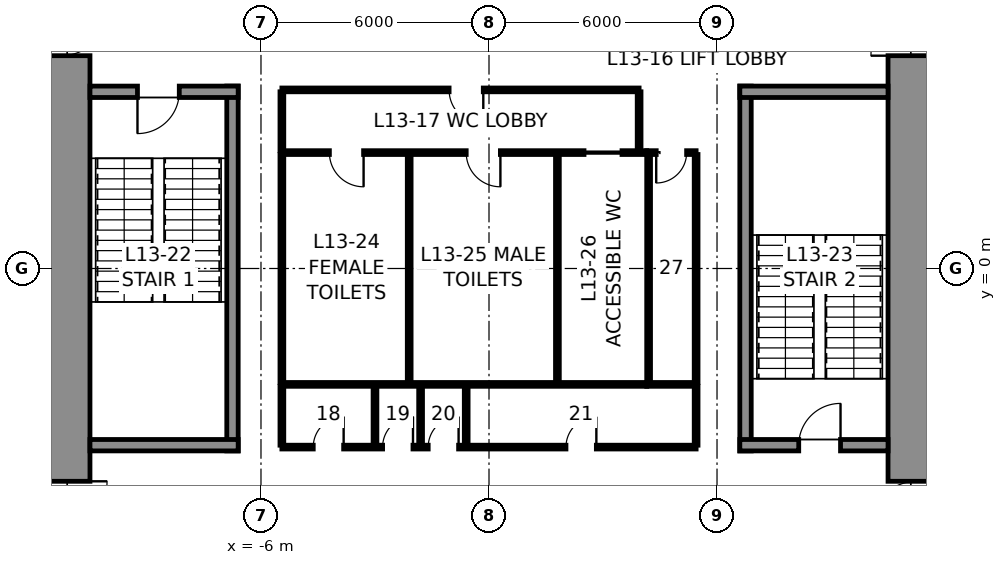
"""IFC4 building model, lengths in metres.
Left out: names, types, materials, properties, quantities, classifications, styles, units other than length and angle.
Written with IfcOpenShell. Run it as: python <this file> out.ifc"""

import sys

from ifc_helpers import new_model, si_unit, direction, frame, frame_2d, origin, place, context, subcontext, project, spatial, rectangle, extrude, element, fill, save


model = new_model("IFC4")
c1 = context("Model", 3, precision=1e-05, world=origin(), true_north=direction((0.0, 1.0)))
c2 = subcontext(c1, "Body", "Model", "MODEL_VIEW")
j1 = project(units=[si_unit("LENGTHUNIT", "METRE"), si_unit("PLANEANGLEUNIT", "RADIAN")], contexts=[c1])
p1 = place(None, origin())
s1 = spatial("IfcSite", under=j1, at=p1, CompositionType="ELEMENT")
p2 = place(p1, origin())
s2 = spatial("IfcBuilding", under=s1, at=p2, CompositionType="ELEMENT")
p3 = place(p2, frame((0.0, 0.0, 70.5)))
s3 = spatial("IfcBuildingStorey", under=s2, at=p3, CompositionType="ELEMENT", Elevation=70.5)
p4 = place(p3, frame((11.25, 10.5, 0.0), z_axis=(0.0, 0.0, 1.0), x_axis=(0.0, -1.0, 0.0)))
e1 = element("IfcWall", 1, at=p4, inside=s3, PredefinedType="SHEAR", context=c2, shape_type="SweptSolid", body=[
    extrude(rectangle(XDim=21.0, YDim=1.5, at=frame_2d((10.5, 0.0))), origin(), (0.0, 0.0, 1.0), 5.5),
])
p5 = place(p4, frame((3.7, 0.0, 0.0)))
e2 = element("IfcOpeningElement", 2, at=p5, cuts=e1, PredefinedType="OPENING", context=c2, shape_type="SweptSolid", body=[
    extrude(rectangle(XDim=1.2, YDim=2.3, at=frame_2d((0.6, 1.15))), frame((0.0, 0.76, 0.0), z_axis=(0.0, -1.0, 0.0), x_axis=(1.0, 0.0, 0.0)), (0.0, 0.0, 1.0), 1.52),
])
p6 = place(p4, frame((16.1, 0.0, 0.0)))
e3 = element("IfcOpeningElement", 3, at=p6, cuts=e1, PredefinedType="OPENING", context=c2, shape_type="SweptSolid", body=[
    extrude(rectangle(XDim=1.2, YDim=2.3, at=frame_2d((0.6, 1.15))), frame((0.0, 0.76, 0.0), z_axis=(0.0, -1.0, 0.0), x_axis=(1.0, 0.0, 0.0)), (0.0, 0.0, 1.0), 1.52),
])
p7 = place(p3, frame((-11.25, -10.5, 0.0), z_axis=(0.0, 0.0, 1.0), x_axis=(0.0, 1.0, 0.0)))
e4 = element("IfcWall", 4, at=p7, inside=s3, PredefinedType="SHEAR", context=c2, shape_type="SweptSolid", body=[
    extrude(rectangle(XDim=21.0, YDim=1.5, at=frame_2d((10.5, 0.0))), origin(), (0.0, 0.0, 1.0), 5.5),
])
p8 = place(p7, frame((16.1, 0.0, 0.0)))
e5 = element("IfcOpeningElement", 5, at=p8, cuts=e4, PredefinedType="OPENING", context=c2, shape_type="SweptSolid", body=[
    extrude(rectangle(XDim=1.2, YDim=2.3, at=frame_2d((0.6, 1.15))), frame((0.0, 0.76, 0.0), z_axis=(0.0, -1.0, 0.0), x_axis=(1.0, 0.0, 0.0)), (0.0, 0.0, 1.0), 1.52),
])
p9 = place(p7, frame((3.7, 0.0, 0.0)))
e6 = element("IfcOpeningElement", 6, at=p9, cuts=e4, PredefinedType="OPENING", context=c2, shape_type="SweptSolid", body=[
    extrude(rectangle(XDim=1.2, YDim=2.3, at=frame_2d((0.6, 1.15))), frame((0.0, 0.76, 0.0), z_axis=(0.0, -1.0, 0.0), x_axis=(1.0, 0.0, 0.0)), (0.0, 0.0, 1.0), 1.52),
])
p10 = place(p3, frame((-6.75, -4.8, 0.0), z_axis=(0.0, 0.0, 1.0), x_axis=(0.0, 1.0, 0.0)))
e7 = element("IfcWall", 7, at=p10, inside=s3, PredefinedType="SOLIDWALL", context=c2, shape_type="SweptSolid", body=[
    extrude(rectangle(XDim=9.6, YDim=0.3, at=frame_2d((4.8, 0.0))), origin(), (0.0, 0.0, 1.0), 5.25),
])
p11 = place(p3, frame((-10.5, 4.65, 0.0), z_axis=(0.0, 0.0, 1.0), x_axis=(1.0, 0.0, 0.0)))
e8 = element("IfcWall", 8, at=p11, inside=s3, PredefinedType="SOLIDWALL", context=c2, shape_type="SweptSolid", body=[
    extrude(rectangle(XDim=3.9, YDim=0.3, at=frame_2d((1.95, 0.0))), origin(), (0.0, 0.0, 1.0), 5.25),
])
p12 = place(p11, frame((1.25, 0.0, 0.0)))
e9 = element("IfcOpeningElement", 9, at=p12, cuts=e8, PredefinedType="OPENING", context=c2, shape_type="SweptSolid", body=[
    extrude(rectangle(XDim=1.1, YDim=2.3, at=frame_2d((0.55, 1.15))), frame((0.0, 0.16, 0.0), z_axis=(0.0, -1.0, 0.0), x_axis=(1.0, 0.0, 0.0)), (0.0, 0.0, 1.0), 0.32),
])
p13 = place(p3, frame((-6.6, -4.65, 0.0), z_axis=(0.0, 0.0, 1.0), x_axis=(-1.0, 0.0, 0.0)))
e10 = element("IfcWall", 10, at=p13, inside=s3, PredefinedType="SOLIDWALL", context=c2, shape_type="SweptSolid", body=[
    extrude(rectangle(XDim=3.9, YDim=0.3, at=frame_2d((1.95, 0.0))), origin(), (0.0, 0.0, 1.0), 5.25),
])
p14 = place(p3, frame((6.75, -4.8, 0.0), z_axis=(0.0, 0.0, 1.0), x_axis=(0.0, 1.0, 0.0)))
e11 = element("IfcWall", 11, at=p14, inside=s3, PredefinedType="SOLIDWALL", context=c2, shape_type="SweptSolid", body=[
    extrude(rectangle(XDim=9.6, YDim=0.3, at=frame_2d((4.8, 0.0))), origin(), (0.0, 0.0, 1.0), 5.25),
])
p15 = place(p3, frame((6.6, 4.65, 0.0), z_axis=(0.0, 0.0, 1.0), x_axis=(1.0, 0.0, 0.0)))
e12 = element("IfcWall", 12, at=p15, inside=s3, PredefinedType="SOLIDWALL", context=c2, shape_type="SweptSolid", body=[
    extrude(rectangle(XDim=3.9, YDim=0.3, at=frame_2d((1.95, 0.0))), origin(), (0.0, 0.0, 1.0), 5.25),
])
p16 = place(p3, frame((10.5, -4.65, 0.0), z_axis=(0.0, 0.0, 1.0), x_axis=(-1.0, 0.0, 0.0)))
e13 = element("IfcWall", 13, at=p16, inside=s3, PredefinedType="SOLIDWALL", context=c2, shape_type="SweptSolid", body=[
    extrude(rectangle(XDim=3.9, YDim=0.3, at=frame_2d((1.95, 0.0))), origin(), (0.0, 0.0, 1.0), 5.25),
])
p17 = place(p16, frame((1.25, 0.0, 0.0)))
e14 = element("IfcOpeningElement", 14, at=p17, cuts=e13, PredefinedType="OPENING", context=c2, shape_type="SweptSolid", body=[
    extrude(rectangle(XDim=1.1, YDim=2.3, at=frame_2d((0.55, 1.15))), frame((0.0, 0.16, 0.0), z_axis=(0.0, -1.0, 0.0), x_axis=(1.0, 0.0, 0.0)), (0.0, 0.0, 1.0), 0.32),
])
p18 = place(p3, frame((-5.45, 3.05, 0.0), z_axis=(0.0, 0.0, 1.0), x_axis=(1.0, 0.0, 0.0)))
e15 = element("IfcWall", 15, at=p18, inside=s3, PredefinedType="PARTITIONING", context=c2, shape_type="SweptSolid", body=[
    extrude(rectangle(XDim=9.6, YDim=0.1, at=frame_2d((4.8, 0.0))), origin(), (0.0, 0.0, 1.0), 5.25),
])
p19 = place(p18, frame((1.25, 0.0, 0.0)))
e16 = element("IfcOpeningElement", 16, at=p19, cuts=e15, PredefinedType="OPENING", context=c2, shape_type="SweptSolid", body=[
    extrude(rectangle(XDim=0.9, YDim=2.3, at=frame_2d((0.45, 1.15))), frame((0.0, 0.06, 0.0), z_axis=(0.0, -1.0, 0.0), x_axis=(1.0, 0.0, 0.0)), (0.0, 0.0, 1.0), 0.12),
])
p20 = place(p18, frame((4.85, 0.0, 0.0)))
e17 = element("IfcOpeningElement", 17, at=p20, cuts=e15, PredefinedType="OPENING", context=c2, shape_type="SweptSolid", body=[
    extrude(rectangle(XDim=0.9, YDim=2.3, at=frame_2d((0.45, 1.15))), frame((0.0, 0.06, 0.0), z_axis=(0.0, -1.0, 0.0), x_axis=(1.0, 0.0, 0.0)), (0.0, 0.0, 1.0), 0.12),
])
p21 = place(p18, frame((7.95, 0.0, 0.0)))
e18 = element("IfcOpeningElement", 18, at=p21, cuts=e15, PredefinedType="OPENING", context=c2, shape_type="SweptSolid", body=[
    extrude(rectangle(XDim=1.0, YDim=2.3, at=frame_2d((0.5, 1.15))), frame((0.0, 0.06, 0.0), z_axis=(0.0, -1.0, 0.0), x_axis=(1.0, 0.0, 0.0)), (0.0, 0.0, 1.0), 0.12),
])
p22 = place(p3, frame((4.15, 3.05, 0.0), z_axis=(0.0, 0.0, 1.0), x_axis=(1.0, 0.0, 0.0)))
e19 = element("IfcWall", 19, at=p22, inside=s3, PredefinedType="PARTITIONING", context=c2, shape_type="SweptSolid", body=[
    extrude(rectangle(XDim=1.3, YDim=0.1, at=frame_2d((0.65, 0.0))), origin(), (0.0, 0.0, 1.0), 5.25),
])
p23 = place(p22, frame((0.25, 0.0, 0.0)))
e20 = element("IfcOpeningElement", 20, at=p23, cuts=e19, PredefinedType="OPENING", context=c2, shape_type="SweptSolid", body=[
    extrude(rectangle(XDim=0.8, YDim=2.3, at=frame_2d((0.4, 1.15))), frame((0.0, 0.06, 0.0), z_axis=(0.0, -1.0, 0.0), x_axis=(1.0, 0.0, 0.0)), (0.0, 0.0, 1.0), 0.12),
])
p24 = place(p3, frame((4.15, -3.05, 0.0), z_axis=(0.0, 0.0, 1.0), x_axis=(-1.0, 0.0, 0.0)))
e21 = element("IfcWall", 21, at=p24, inside=s3, PredefinedType="PARTITIONING", context=c2, shape_type="SweptSolid", body=[
    extrude(rectangle(XDim=9.6, YDim=0.1, at=frame_2d((4.8, 0.0))), origin(), (0.0, 0.0, 1.0), 5.25),
])
p25 = place(p3, frame((5.45, -3.05, 0.0), z_axis=(0.0, 0.0, 1.0), x_axis=(-1.0, 0.0, 0.0)))
e22 = element("IfcWall", 22, at=p25, inside=s3, PredefinedType="PARTITIONING", context=c2, shape_type="SweptSolid", body=[
    extrude(rectangle(XDim=1.3, YDim=0.1, at=frame_2d((0.65, 0.0))), origin(), (0.0, 0.0, 1.0), 5.25),
])
for number, where, z_axis, x_axis in (
    (23, (5.45, 3.0, 0.0), (0.0, 0.0, 1.0), (0.0, -1.0, 0.0)),
    (24, (-5.45, -3.0, 0.0), (0.0, 0.0, 1.0), (0.0, 1.0, 0.0)),
    (25, (-2.1, -3.0, 0.0), (0.0, 0.0, 1.0), (0.0, 1.0, 0.0)),
    (26, (1.8, -3.0, 0.0), (0.0, 0.0, 1.0), (0.0, 1.0, 0.0)),
    (27, (4.2, -3.0, 0.0), (0.0, 0.0, 1.0), (0.0, 1.0, 0.0)),
):
    element("IfcWall", number, at=place(p3, frame(where, z_axis=z_axis, x_axis=x_axis)), inside=s3, PredefinedType="PARTITIONING", context=c2, shape_type="SweptSolid", body=[
        extrude(rectangle(XDim=6.0, YDim=0.1, at=frame_2d((3.0, 0.0))), origin(), (0.0, 0.0, 1.0), 5.25),
    ])
p26 = place(p3, frame((-5.45, 4.7, 0.0), z_axis=(0.0, 0.0, 1.0), x_axis=(1.0, 0.0, 0.0)))
e28 = element("IfcWall", 28, at=p26, inside=s3, PredefinedType="PARTITIONING", context=c2, shape_type="SweptSolid", body=[
    extrude(rectangle(XDim=9.4, YDim=0.1, at=frame_2d((4.7, 0.0))), origin(), (0.0, 0.0, 1.0), 5.25),
])
p27 = place(p26, frame((4.4, 0.0, 0.0)))
e29 = element("IfcOpeningElement", 29, at=p27, cuts=e28, PredefinedType="OPENING", context=c2, shape_type="SweptSolid", body=[
    extrude(rectangle(XDim=0.9, YDim=2.3, at=frame_2d((0.45, 1.15))), frame((0.0, 0.06, 0.0), z_axis=(0.0, -1.0, 0.0), x_axis=(1.0, 0.0, 0.0)), (0.0, 0.0, 1.0), 0.12),
])
for number, where, z_axis, x_axis in (
    (30, (-5.45, 3.1, 0.0), (0.0, 0.0, 1.0), (0.0, 1.0, 0.0)),
    (31, (3.95, 3.1, 0.0), (0.0, 0.0, 1.0), (0.0, 1.0, 0.0)),
):
    element("IfcWall", number, at=place(p3, frame(where, z_axis=z_axis, x_axis=x_axis)), inside=s3, PredefinedType="PARTITIONING", context=c2, shape_type="SweptSolid", body=[
        extrude(rectangle(XDim=1.55, YDim=0.1, at=frame_2d((0.775, 0.0))), origin(), (0.0, 0.0, 1.0), 5.25),
    ])
p28 = place(p3, frame((5.45, -4.7, 0.0), z_axis=(0.0, 0.0, 1.0), x_axis=(-1.0, 0.0, 0.0)))
e32 = element("IfcWall", 32, at=p28, inside=s3, PredefinedType="PARTITIONING", context=c2, shape_type="SweptSolid", body=[
    extrude(rectangle(XDim=10.9, YDim=0.1, at=frame_2d((5.45, 0.0))), origin(), (0.0, 0.0, 1.0), 5.25),
])
p29 = place(p28, frame((9.275, 0.0, 0.0)))
e33 = element("IfcOpeningElement", 33, at=p29, cuts=e32, PredefinedType="OPENING", context=c2, shape_type="SweptSolid", body=[
    extrude(rectangle(XDim=0.8, YDim=2.3, at=frame_2d((0.4, 1.15))), frame((0.0, 0.06, 0.0), z_axis=(0.0, -1.0, 0.0), x_axis=(1.0, 0.0, 0.0)), (0.0, 0.0, 1.0), 0.12),
])
p30 = place(p28, frame((7.45, 0.0, 0.0)))
e34 = element("IfcOpeningElement", 34, at=p30, cuts=e32, PredefinedType="OPENING", context=c2, shape_type="SweptSolid", body=[
    extrude(rectangle(XDim=0.8, YDim=2.3, at=frame_2d((0.4, 1.15))), frame((0.0, 0.06, 0.0), z_axis=(0.0, -1.0, 0.0), x_axis=(1.0, 0.0, 0.0)), (0.0, 0.0, 1.0), 0.12),
])
p31 = place(p28, frame((6.25, 0.0, 0.0)))
e35 = element("IfcOpeningElement", 35, at=p31, cuts=e32, PredefinedType="OPENING", context=c2, shape_type="SweptSolid", body=[
    extrude(rectangle(XDim=0.8, YDim=2.3, at=frame_2d((0.4, 1.15))), frame((0.0, 0.06, 0.0), z_axis=(0.0, -1.0, 0.0), x_axis=(1.0, 0.0, 0.0)), (0.0, 0.0, 1.0), 0.12),
])
p32 = place(p28, frame((2.625, 0.0, 0.0)))
e36 = element("IfcOpeningElement", 36, at=p32, cuts=e32, PredefinedType="OPENING", context=c2, shape_type="SweptSolid", body=[
    extrude(rectangle(XDim=0.8, YDim=2.3, at=frame_2d((0.4, 1.15))), frame((0.0, 0.06, 0.0), z_axis=(0.0, -1.0, 0.0), x_axis=(1.0, 0.0, 0.0)), (0.0, 0.0, 1.0), 0.12),
])
for number, where, z_axis, x_axis in (
    (37, (-5.45, -3.1, 0.0), (0.0, 0.0, 1.0), (0.0, -1.0, 0.0)),
    (38, (5.45, -3.1, 0.0), (0.0, 0.0, 1.0), (0.0, -1.0, 0.0)),
    (39, (-3.0, -3.1, 0.0), (0.0, 0.0, 1.0), (0.0, -1.0, 0.0)),
    (40, (-1.8, -3.1, 0.0), (0.0, 0.0, 1.0), (0.0, -1.0, 0.0)),
    (41, (-0.6, -3.1, 0.0), (0.0, 0.0, 1.0), (0.0, -1.0, 0.0)),
):
    element("IfcWall", number, at=place(p3, frame(where, z_axis=z_axis, x_axis=x_axis)), inside=s3, PredefinedType="PARTITIONING", context=c2, shape_type="SweptSolid", body=[
        extrude(rectangle(XDim=1.55, YDim=0.1, at=frame_2d((0.775, 0.0))), origin(), (0.0, 0.0, 1.0), 5.25),
    ])
p33 = place(p12, frame((1.1, 0.0, 0.0), z_axis=(0.0, 0.0, 1.0), x_axis=(-1.0, 0.0, 0.0)))
e42 = element("IfcDoor", 42, at=p33, inside=s3, OperationType="SINGLE_SWING_RIGHT", PredefinedType="DOOR", context=c2, shape_type="SweptSolid", body=[
    extrude(rectangle(XDim=1.1, YDim=2.3, at=frame_2d((0.55, 1.15))), frame((0.0, 0.025, 0.0), z_axis=(0.0, -1.0, 0.0), x_axis=(1.0, 0.0, 0.0)), (0.0, 0.0, 1.0), 0.05),
])
fill(e9, e42)
p34 = place(p17, frame((1.1, 0.0, 0.0), z_axis=(0.0, 0.0, 1.0), x_axis=(-1.0, 0.0, 0.0)))
e43 = element("IfcDoor", 43, at=p34, inside=s3, OperationType="SINGLE_SWING_RIGHT", PredefinedType="DOOR", context=c2, shape_type="SweptSolid", body=[
    extrude(rectangle(XDim=1.1, YDim=2.3, at=frame_2d((0.55, 1.15))), frame((0.0, 0.025, 0.0), z_axis=(0.0, -1.0, 0.0), x_axis=(1.0, 0.0, 0.0)), (0.0, 0.0, 1.0), 0.05),
])
fill(e14, e43)
p35 = place(p19, frame((0.9, 0.0, 0.0), z_axis=(0.0, 0.0, 1.0), x_axis=(-1.0, 0.0, 0.0)))
e44 = element("IfcDoor", 44, at=p35, inside=s3, OperationType="SINGLE_SWING_LEFT", PredefinedType="DOOR", context=c2, shape_type="SweptSolid", body=[
    extrude(rectangle(XDim=0.9, YDim=2.3, at=frame_2d((0.45, 1.15))), frame((0.0, 0.025, 0.0), z_axis=(0.0, -1.0, 0.0), x_axis=(1.0, 0.0, 0.0)), (0.0, 0.0, 1.0), 0.05),
])
fill(e16, e44)
p36 = place(p20, frame((0.9, 0.0, 0.0), z_axis=(0.0, 0.0, 1.0), x_axis=(-1.0, 0.0, 0.0)))
e45 = element("IfcDoor", 45, at=p36, inside=s3, OperationType="SINGLE_SWING_LEFT", PredefinedType="DOOR", context=c2, shape_type="SweptSolid", body=[
    extrude(rectangle(XDim=0.9, YDim=2.3, at=frame_2d((0.45, 1.15))), frame((0.0, 0.025, 0.0), z_axis=(0.0, -1.0, 0.0), x_axis=(1.0, 0.0, 0.0)), (0.0, 0.0, 1.0), 0.05),
])
fill(e17, e45)
p37 = place(p21, frame((1.0, 0.0, 0.0), z_axis=(0.0, 0.0, 1.0), x_axis=(-1.0, 0.0, 0.0)))
e46 = element("IfcDoor", 46, at=p37, inside=s3, OperationType="SLIDING_TO_LEFT", PredefinedType="DOOR", context=c2, shape_type="SweptSolid", body=[
    extrude(rectangle(XDim=1.0, YDim=2.3, at=frame_2d((0.5, 1.15))), frame((0.0, 0.025, 0.0), z_axis=(0.0, -1.0, 0.0), x_axis=(1.0, 0.0, 0.0)), (0.0, 0.0, 1.0), 0.05),
])
fill(e18, e46)
p38 = place(p23, frame((0.8, 0.0, 0.0), z_axis=(0.0, 0.0, 1.0), x_axis=(-1.0, 0.0, 0.0)))
e47 = element("IfcDoor", 47, at=p38, inside=s3, OperationType="SINGLE_SWING_RIGHT", PredefinedType="DOOR", context=c2, shape_type="SweptSolid", body=[
    extrude(rectangle(XDim=0.8, YDim=2.3, at=frame_2d((0.4, 1.15))), frame((0.0, 0.025, 0.0), z_axis=(0.0, -1.0, 0.0), x_axis=(1.0, 0.0, 0.0)), (0.0, 0.0, 1.0), 0.05),
])
fill(e20, e47)
p39 = place(p27, frame((0.9, 0.0, 0.0), z_axis=(0.0, 0.0, 1.0), x_axis=(-1.0, 0.0, 0.0)))
e48 = element("IfcDoor", 48, at=p39, inside=s3, OperationType="SINGLE_SWING_LEFT", PredefinedType="DOOR", context=c2, shape_type="SweptSolid", body=[
    extrude(rectangle(XDim=0.9, YDim=2.3, at=frame_2d((0.45, 1.15))), frame((0.0, 0.025, 0.0), z_axis=(0.0, -1.0, 0.0), x_axis=(1.0, 0.0, 0.0)), (0.0, 0.0, 1.0), 0.05),
])
fill(e29, e48)
p40 = place(p29, frame((0.8, 0.0, 0.0), z_axis=(0.0, 0.0, 1.0), x_axis=(-1.0, 0.0, 0.0)))
e49 = element("IfcDoor", 49, at=p40, inside=s3, OperationType="SINGLE_SWING_RIGHT", PredefinedType="DOOR", context=c2, shape_type="SweptSolid", body=[
    extrude(rectangle(XDim=0.8, YDim=2.3, at=frame_2d((0.4, 1.15))), frame((0.0, 0.025, 0.0), z_axis=(0.0, -1.0, 0.0), x_axis=(1.0, 0.0, 0.0)), (0.0, 0.0, 1.0), 0.05),
])
fill(e33, e49)
p41 = place(p30, frame((0.8, 0.0, 0.0), z_axis=(0.0, 0.0, 1.0), x_axis=(-1.0, 0.0, 0.0)))
e50 = element("IfcDoor", 50, at=p41, inside=s3, OperationType="SINGLE_SWING_RIGHT", PredefinedType="DOOR", context=c2, shape_type="SweptSolid", body=[
    extrude(rectangle(XDim=0.8, YDim=2.3, at=frame_2d((0.4, 1.15))), frame((0.0, 0.025, 0.0), z_axis=(0.0, -1.0, 0.0), x_axis=(1.0, 0.0, 0.0)), (0.0, 0.0, 1.0), 0.05),
])
fill(e34, e50)
p42 = place(p31, frame((0.8, 0.0, 0.0), z_axis=(0.0, 0.0, 1.0), x_axis=(-1.0, 0.0, 0.0)))
e51 = element("IfcDoor", 51, at=p42, inside=s3, OperationType="SINGLE_SWING_RIGHT", PredefinedType="DOOR", context=c2, shape_type="SweptSolid", body=[
    extrude(rectangle(XDim=0.8, YDim=2.3, at=frame_2d((0.4, 1.15))), frame((0.0, 0.025, 0.0), z_axis=(0.0, -1.0, 0.0), x_axis=(1.0, 0.0, 0.0)), (0.0, 0.0, 1.0), 0.05),
])
fill(e35, e51)
p43 = place(p32, frame((0.8, 0.0, 0.0), z_axis=(0.0, 0.0, 1.0), x_axis=(-1.0, 0.0, 0.0)))
e52 = element("IfcDoor", 52, at=p43, inside=s3, OperationType="SINGLE_SWING_RIGHT", PredefinedType="DOOR", context=c2, shape_type="SweptSolid", body=[
    extrude(rectangle(XDim=0.8, YDim=2.3, at=frame_2d((0.4, 1.15))), frame((0.0, 0.025, 0.0), z_axis=(0.0, -1.0, 0.0), x_axis=(1.0, 0.0, 0.0)), (0.0, 0.0, 1.0), 0.05),
])
fill(e36, e52)
p44 = place(p8, frame((1.2, 0.0, 0.0), z_axis=(0.0, 0.0, 1.0), x_axis=(-1.0, 0.0, 0.0)))
e53 = element("IfcDoor", 53, at=p44, inside=s3, OperationType="SINGLE_SWING_LEFT", PredefinedType="DOOR", context=c2, shape_type="SweptSolid", body=[
    extrude(rectangle(XDim=1.2, YDim=2.3, at=frame_2d((0.6, 1.15))), frame((0.0, 0.025, 0.0), z_axis=(0.0, -1.0, 0.0), x_axis=(1.0, 0.0, 0.0)), (0.0, 0.0, 1.0), 0.05),
])
fill(e5, e53)
p45 = place(p9, frame((1.2, 0.0, 0.0), z_axis=(0.0, 0.0, 1.0), x_axis=(-1.0, 0.0, 0.0)))
e54 = element("IfcDoor", 54, at=p45, inside=s3, OperationType="SINGLE_SWING_LEFT", PredefinedType="DOOR", context=c2, shape_type="SweptSolid", body=[
    extrude(rectangle(XDim=1.2, YDim=2.3, at=frame_2d((0.6, 1.15))), frame((0.0, 0.025, 0.0), z_axis=(0.0, -1.0, 0.0), x_axis=(1.0, 0.0, 0.0)), (0.0, 0.0, 1.0), 0.05),
])
fill(e6, e54)
p46 = place(p5, frame((1.2, 0.0, 0.0), z_axis=(0.0, 0.0, 1.0), x_axis=(-1.0, 0.0, 0.0)))
e55 = element("IfcDoor", 55, at=p46, inside=s3, OperationType="SINGLE_SWING_LEFT", PredefinedType="DOOR", context=c2, shape_type="SweptSolid", body=[
    extrude(rectangle(XDim=1.2, YDim=2.3, at=frame_2d((0.6, 1.15))), frame((0.0, 0.025, 0.0), z_axis=(0.0, -1.0, 0.0), x_axis=(1.0, 0.0, 0.0)), (0.0, 0.0, 1.0), 0.05),
])
fill(e2, e55)
p47 = place(p6, frame((1.2, 0.0, 0.0), z_axis=(0.0, 0.0, 1.0), x_axis=(-1.0, 0.0, 0.0)))
e56 = element("IfcDoor", 56, at=p47, inside=s3, OperationType="SINGLE_SWING_LEFT", PredefinedType="DOOR", context=c2, shape_type="SweptSolid", body=[
    extrude(rectangle(XDim=1.2, YDim=2.3, at=frame_2d((0.6, 1.15))), frame((0.0, 0.025, 0.0), z_axis=(0.0, -1.0, 0.0), x_axis=(1.0, 0.0, 0.0)), (0.0, 0.0, 1.0), 0.05),
])
fill(e3, e56)
save(model, sys.argv[1])
